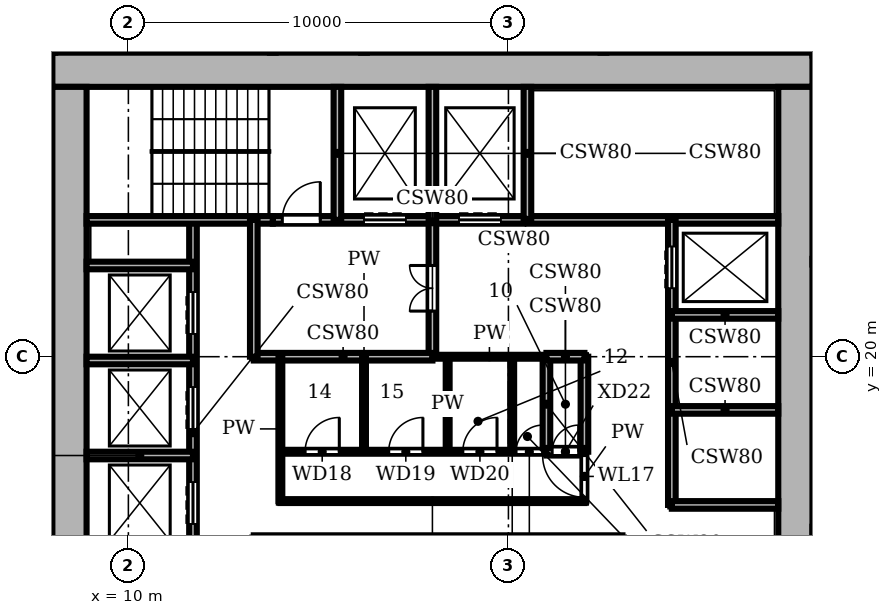
"""IFC4 building model, lengths in metres.
Left out: names, types, materials, properties, quantities, classifications, styles, units other than length and angle.
Written with IfcOpenShell. Run it as: python <this file> out.ifc"""

import sys

from ifc_helpers import new_model, si_unit, direction, frame, frame_2d, origin, place, context, subcontext, project, spatial, rectangle, extrude, element, fill, save


model = new_model("IFC4")
c1 = context("Model", 3, precision=1e-05, world=origin(), true_north=direction((0.0, 1.0)))
c2 = subcontext(c1, "Body", "Model", "MODEL_VIEW")
j1 = project(units=[si_unit("LENGTHUNIT", "METRE"), si_unit("PLANEANGLEUNIT", "RADIAN")], contexts=[c1])
p1 = place(None, origin())
s1 = spatial("IfcSite", under=j1, at=p1, CompositionType="ELEMENT")
p2 = place(p1, origin())
s2 = spatial("IfcBuilding", under=s1, at=p2, CompositionType="ELEMENT")
p3 = place(p2, frame((0.0, 0.0, 43.2)))
s3 = spatial("IfcBuildingStorey", under=s2, at=p3, CompositionType="ELEMENT", Elevation=43.2)
p4 = place(p3, frame((27.55, 8.9, 0.0), z_axis=(0.0, 0.0, 1.0), x_axis=(0.0, 1.0, 0.0)))
e1 = element("IfcWall", 1, at=p4, inside=s3, PredefinedType="SHEAR", context=c2, shape_type="SweptSolid", body=[
    extrude(rectangle(XDim=18.2, YDim=0.9, at=frame_2d((9.1, 0.0))), origin(), (0.0, 0.0, 1.0), 3.9),
])
p5 = place(p4, frame((4.55, 0.0, 0.0)))
e2 = element("IfcOpeningElement", 2, at=p5, cuts=e1, PredefinedType="OPENING", context=c2, shape_type="SweptSolid", body=[
    extrude(rectangle(XDim=1.6, YDim=2.1, at=frame_2d((0.8, 1.05))), frame((0.0, 0.46, 0.0), z_axis=(0.0, -1.0, 0.0), x_axis=(1.0, 0.0, 0.0)), (0.0, 0.0, 1.0), 0.92),
])
p6 = place(p3, frame((28.0, 27.55, 0.0), z_axis=(0.0, 0.0, 1.0), x_axis=(-1.0, 0.0, 0.0)))
e3 = element("IfcWall", 3, at=p6, inside=s3, PredefinedType="SHEAR", context=c2, shape_type="SweptSolid", body=[
    extrude(rectangle(XDim=20.0, YDim=0.9, at=frame_2d((10.0, 0.0))), origin(), (0.0, 0.0, 1.0), 3.9),
])
p7 = place(p3, frame((8.45, 27.1, 0.0), z_axis=(0.0, 0.0, 1.0), x_axis=(0.0, -1.0, 0.0)))
e4 = element("IfcWall", 4, at=p7, inside=s3, PredefinedType="SHEAR", context=c2, shape_type="SweptSolid", body=[
    extrude(rectangle(XDim=18.2, YDim=0.9, at=frame_2d((9.1, 0.0))), origin(), (0.0, 0.0, 1.0), 3.9),
])
p8 = place(p3, frame((24.3, 16.1, 0.0), z_axis=(0.0, 0.0, 1.0), x_axis=(1.0, 0.0, 0.0)))
e5 = element("IfcWall", 5, at=p8, inside=s3, PredefinedType="SHEAR", context=c2, shape_type="SweptSolid", body=[
    extrude(rectangle(XDim=2.8, YDim=0.2, at=frame_2d((1.4, 0.0))), origin(), (0.0, 0.0, 1.0), 3.58),
])
p9 = place(p3, frame((14.0, 16.2, 0.0), z_axis=(0.0, 0.0, 1.0), x_axis=(1.0, 0.0, 0.0)))
e6 = element("IfcWall", 6, at=p9, inside=s3, PredefinedType="PARTITIONING", context=c2, shape_type="SweptSolid", body=[
    extrude(rectangle(XDim=8.0, YDim=0.1, at=frame_2d((4.0, 0.0))), origin(), (0.0, 0.0, 1.0), 3.58),
])
p10 = place(p3, frame((8.9, 17.4, 0.0), z_axis=(0.0, 0.0, 1.0), x_axis=(1.0, 0.0, 0.0)))
e7 = element("IfcWall", 7, at=p10, inside=s3, PredefinedType="SHEAR", context=c2, shape_type="SweptSolid", body=[
    extrude(rectangle(XDim=2.8, YDim=0.2, at=frame_2d((1.4, 0.0))), origin(), (0.0, 0.0, 1.0), 3.58),
])
p11 = place(p3, frame((14.0, 17.5, 0.0), z_axis=(0.0, 0.0, 1.0), x_axis=(1.0, 0.0, 0.0)))
e8 = element("IfcWall", 8, at=p11, inside=s3, PredefinedType="PARTITIONING", context=c2, shape_type="SweptSolid", body=[
    extrude(rectangle(XDim=7.0, YDim=0.1, at=frame_2d((3.5, 0.0))), origin(), (0.0, 0.0, 1.0), 3.58),
])
p12 = place(p11, frame((0.65, 0.0, 0.0)))
e9 = element("IfcOpeningElement", 9, at=p12, cuts=e8, PredefinedType="OPENING", context=c2, shape_type="SweptSolid", body=[
    extrude(rectangle(XDim=0.9, YDim=2.1, at=frame_2d((0.45, 1.05))), frame((0.0, 0.06, 0.0), z_axis=(0.0, -1.0, 0.0), x_axis=(1.0, 0.0, 0.0)), (0.0, 0.0, 1.0), 0.12),
])
p13 = place(p11, frame((2.85, 0.0, 0.0)))
e10 = element("IfcOpeningElement", 10, at=p13, cuts=e8, PredefinedType="OPENING", context=c2, shape_type="SweptSolid", body=[
    extrude(rectangle(XDim=0.9, YDim=2.1, at=frame_2d((0.45, 1.05))), frame((0.0, 0.06, 0.0), z_axis=(0.0, -1.0, 0.0), x_axis=(1.0, 0.0, 0.0)), (0.0, 0.0, 1.0), 0.12),
])
p14 = place(p11, frame((4.8, 0.0, 0.0)))
e11 = element("IfcOpeningElement", 11, at=p14, cuts=e8, PredefinedType="OPENING", context=c2, shape_type="SweptSolid", body=[
    extrude(rectangle(XDim=0.9, YDim=2.1, at=frame_2d((0.45, 1.05))), frame((0.0, 0.06, 0.0), z_axis=(0.0, -1.0, 0.0), x_axis=(1.0, 0.0, 0.0)), (0.0, 0.0, 1.0), 0.12),
])
p15 = place(p11, frame((6.2, 0.0, 0.0)))
e12 = element("IfcOpeningElement", 12, at=p15, cuts=e8, PredefinedType="OPENING", context=c2, shape_type="SweptSolid", body=[
    extrude(rectangle(XDim=0.7, YDim=2.1, at=frame_2d((0.35, 1.05))), frame((0.0, 0.06, 0.0), z_axis=(0.0, -1.0, 0.0), x_axis=(1.0, 0.0, 0.0)), (0.0, 0.0, 1.0), 0.12),
])
p16 = place(p3, frame((21.0, 17.5, 0.0), z_axis=(0.0, 0.0, 1.0), x_axis=(1.0, 0.0, 0.0)))
e13 = element("IfcWall", 13, at=p16, inside=s3, PredefinedType="SHEAR", context=c2, shape_type="SweptSolid", body=[
    extrude(rectangle(XDim=1.0, YDim=0.2, at=frame_2d((0.5, 0.0))), origin(), (0.0, 0.0, 1.0), 3.58),
])
p17 = place(p16, frame((0.15, 0.0, 0.0)))
e14 = element("IfcOpeningElement", 14, at=p17, cuts=e13, PredefinedType="OPENING", context=c2, shape_type="SweptSolid", body=[
    extrude(rectangle(XDim=0.7, YDim=2.1, at=frame_2d((0.35, 1.05))), frame((0.0, 0.11, 0.0), z_axis=(0.0, -1.0, 0.0), x_axis=(1.0, 0.0, 0.0)), (0.0, 0.0, 1.0), 0.22),
])
for number, where, z_axis, x_axis in (
    (15, (24.3, 18.6, 0.0), (0.0, 0.0, 1.0), (1.0, 0.0, 0.0)),
    (16, (8.9, 19.9, 0.0), (0.0, 0.0, 1.0), (1.0, 0.0, 0.0)),
):
    element("IfcWall", number, at=place(p3, frame(where, z_axis=z_axis, x_axis=x_axis)), inside=s3, PredefinedType="SHEAR", context=c2, shape_type="SweptSolid", body=[
        extrude(rectangle(XDim=2.8, YDim=0.2, at=frame_2d((1.4, 0.0))), origin(), (0.0, 0.0, 1.0), 3.58),
    ])
p18 = place(p3, frame((18.0, 20.0, 0.0), z_axis=(0.0, 0.0, 1.0), x_axis=(1.0, 0.0, 0.0)))
e17 = element("IfcWall", 17, at=p18, inside=s3, PredefinedType="PARTITIONING", context=c2, shape_type="SweptSolid", body=[
    extrude(rectangle(XDim=3.0, YDim=0.1, at=frame_2d((1.5, 0.0))), origin(), (0.0, 0.0, 1.0), 3.58),
])
p19 = place(p3, frame((13.3, 20.0, 0.0), z_axis=(0.0, 0.0, 1.0), x_axis=(1.0, 0.0, 0.0)))
e18 = element("IfcWall", 18, at=p19, inside=s3, PredefinedType="SHEAR", context=c2, shape_type="SweptSolid", body=[
    extrude(rectangle(XDim=4.7, YDim=0.2, at=frame_2d((2.35, 0.0))), origin(), (0.0, 0.0, 1.0), 3.58),
])
p20 = place(p3, frame((21.0, 20.0, 0.0), z_axis=(0.0, 0.0, 1.0), x_axis=(1.0, 0.0, 0.0)))
e19 = element("IfcWall", 19, at=p20, inside=s3, PredefinedType="SHEAR", context=c2, shape_type="SweptSolid", body=[
    extrude(rectangle(XDim=1.0, YDim=0.2, at=frame_2d((0.5, 0.0))), origin(), (0.0, 0.0, 1.0), 3.58),
])
for number, where, z_axis, x_axis in (
    (20, (24.3, 21.1, 0.0), (0.0, 0.0, 1.0), (1.0, 0.0, 0.0)),
    (21, (8.9, 22.4, 0.0), (0.0, 0.0, 1.0), (1.0, 0.0, 0.0)),
):
    element("IfcWall", number, at=place(p3, frame(where, z_axis=z_axis, x_axis=x_axis)), inside=s3, PredefinedType="SHEAR", context=c2, shape_type="SweptSolid", body=[
        extrude(rectangle(XDim=2.8, YDim=0.2, at=frame_2d((1.4, 0.0))), origin(), (0.0, 0.0, 1.0), 3.58),
    ])
p21 = place(p3, frame((8.9, 23.6, 0.0), z_axis=(0.0, 0.0, 1.0), x_axis=(1.0, 0.0, 0.0)))
e22 = element("IfcWall", 22, at=p21, inside=s3, PredefinedType="SHEAR", context=c2, shape_type="SweptSolid", body=[
    extrude(rectangle(XDim=4.9, YDim=0.2, at=frame_2d((2.45, 0.0))), origin(), (0.0, 0.0, 1.0), 3.58),
])
p22 = place(p3, frame((13.8, 23.6, 0.0), z_axis=(0.0, 0.0, 1.0), x_axis=(1.0, 0.0, 0.0)))
e23 = element("IfcWall", 23, at=p22, inside=s3, PredefinedType="SHEAR", context=c2, shape_type="SweptSolid", body=[
    extrude(rectangle(XDim=13.3, YDim=0.2, at=frame_2d((6.65, 0.0))), origin(), (0.0, 0.0, 1.0), 3.58),
])
p23 = place(p22, frame((2.4, 0.0, 0.0)))
e24 = element("IfcOpeningElement", 24, at=p23, cuts=e23, PredefinedType="OPENING", context=c2, shape_type="SweptSolid", body=[
    extrude(rectangle(XDim=1.1, YDim=2.1, at=frame_2d((0.55, 1.05))), frame((0.0, 0.11, 0.0), z_axis=(0.0, -1.0, 0.0), x_axis=(1.0, 0.0, 0.0)), (0.0, 0.0, 1.0), 0.22),
])
p24 = place(p22, frame((4.9, 0.0, 0.0)))
e25 = element("IfcOpeningElement", 25, at=p24, cuts=e23, PredefinedType="OPENING", context=c2, shape_type="SweptSolid", body=[
    extrude(rectangle(XDim=1.1, YDim=2.1, at=frame_2d((0.55, 1.05))), frame((0.0, 0.11, 0.0), z_axis=(0.0, -1.0, 0.0), x_axis=(1.0, 0.0, 0.0)), (0.0, 0.0, 1.0), 0.22),
])
p25 = place(p22, frame((0.25, 0.0, 0.0)))
e26 = element("IfcOpeningElement", 26, at=p25, cuts=e23, PredefinedType="OPENING", context=c2, shape_type="SweptSolid", body=[
    extrude(rectangle(XDim=1.0, YDim=2.1, at=frame_2d((0.5, 1.05))), frame((0.0, 0.11, 0.0), z_axis=(0.0, -1.0, 0.0), x_axis=(1.0, 0.0, 0.0)), (0.0, 0.0, 1.0), 0.22),
])
p26 = place(p3, frame((11.7, 12.4, 0.0), z_axis=(0.0, 0.0, 1.0), x_axis=(0.0, 1.0, 0.0)))
e27 = element("IfcWall", 27, at=p26, inside=s3, PredefinedType="SHEAR", context=c2, shape_type="SweptSolid", body=[
    extrude(rectangle(XDim=11.2, YDim=0.2, at=frame_2d((5.6, 0.0))), origin(), (0.0, 0.0, 1.0), 3.58),
])
p27 = place(p26, frame((0.7, 0.0, 0.0)))
e28 = element("IfcOpeningElement", 28, at=p27, cuts=e27, PredefinedType="OPENING", context=c2, shape_type="SweptSolid", body=[
    extrude(rectangle(XDim=1.1, YDim=2.1, at=frame_2d((0.55, 1.05))), frame((0.0, 0.11, 0.0), z_axis=(0.0, -1.0, 0.0), x_axis=(1.0, 0.0, 0.0)), (0.0, 0.0, 1.0), 0.22),
])
p28 = place(p26, frame((3.2, 0.0, 0.0)))
e29 = element("IfcOpeningElement", 29, at=p28, cuts=e27, PredefinedType="OPENING", context=c2, shape_type="SweptSolid", body=[
    extrude(rectangle(XDim=1.1, YDim=2.1, at=frame_2d((0.55, 1.05))), frame((0.0, 0.11, 0.0), z_axis=(0.0, -1.0, 0.0), x_axis=(1.0, 0.0, 0.0)), (0.0, 0.0, 1.0), 0.22),
])
p29 = place(p26, frame((5.7, 0.0, 0.0)))
e30 = element("IfcOpeningElement", 30, at=p29, cuts=e27, PredefinedType="OPENING", context=c2, shape_type="SweptSolid", body=[
    extrude(rectangle(XDim=1.1, YDim=2.1, at=frame_2d((0.55, 1.05))), frame((0.0, 0.11, 0.0), z_axis=(0.0, -1.0, 0.0), x_axis=(1.0, 0.0, 0.0)), (0.0, 0.0, 1.0), 0.22),
])
p30 = place(p26, frame((8.2, 0.0, 0.0)))
e31 = element("IfcOpeningElement", 31, at=p30, cuts=e27, PredefinedType="OPENING", context=c2, shape_type="SweptSolid", body=[
    extrude(rectangle(XDim=1.1, YDim=2.1, at=frame_2d((0.55, 1.05))), frame((0.0, 0.11, 0.0), z_axis=(0.0, -1.0, 0.0), x_axis=(1.0, 0.0, 0.0)), (0.0, 0.0, 1.0), 0.22),
])
p31 = place(p3, frame((13.3, 20.0, 0.0), z_axis=(0.0, 0.0, 1.0), x_axis=(0.0, 1.0, 0.0)))
e32 = element("IfcWall", 32, at=p31, inside=s3, PredefinedType="SHEAR", context=c2, shape_type="SweptSolid", body=[
    extrude(rectangle(XDim=3.6, YDim=0.2, at=frame_2d((1.8, 0.0))), origin(), (0.0, 0.0, 1.0), 3.58),
])
p32 = place(p3, frame((14.0, 16.2, 0.0), z_axis=(0.0, 0.0, 1.0), x_axis=(0.0, 1.0, 0.0)))
e33 = element("IfcWall", 33, at=p32, inside=s3, PredefinedType="PARTITIONING", context=c2, shape_type="SweptSolid", body=[
    extrude(rectangle(XDim=3.8, YDim=0.1, at=frame_2d((1.9, 0.0))), origin(), (0.0, 0.0, 1.0), 3.58),
])
p33 = place(p3, frame((15.5, 23.6, 0.0), z_axis=(0.0, 0.0, 1.0), x_axis=(0.0, 1.0, 0.0)))
e34 = element("IfcWall", 34, at=p33, inside=s3, PredefinedType="SHEAR", context=c2, shape_type="SweptSolid", body=[
    extrude(rectangle(XDim=3.5, YDim=0.2, at=frame_2d((1.75, 0.0))), origin(), (0.0, 0.0, 1.0), 3.58),
])
p34 = place(p3, frame((16.2, 17.5, 0.0), z_axis=(0.0, 0.0, 1.0), x_axis=(0.0, 1.0, 0.0)))
e35 = element("IfcWall", 35, at=p34, inside=s3, PredefinedType="PARTITIONING", context=c2, shape_type="SweptSolid", body=[
    extrude(rectangle(XDim=2.5, YDim=0.1, at=frame_2d((1.25, 0.0))), origin(), (0.0, 0.0, 1.0), 3.58),
])
p35 = place(p3, frame((18.0, 20.0, 0.0), z_axis=(0.0, 0.0, 1.0), x_axis=(0.0, 1.0, 0.0)))
e36 = element("IfcWall", 36, at=p35, inside=s3, PredefinedType="SHEAR", context=c2, shape_type="SweptSolid", body=[
    extrude(rectangle(XDim=7.1, YDim=0.2, at=frame_2d((3.55, 0.0))), origin(), (0.0, 0.0, 1.0), 3.58),
])
p36 = place(p35, frame((1.2, 0.0, 0.0)))
e37 = element("IfcOpeningElement", 37, at=p36, cuts=e36, PredefinedType="OPENING", context=c2, shape_type="SweptSolid", body=[
    extrude(rectangle(XDim=1.2, YDim=2.1, at=frame_2d((0.6, 1.05))), frame((0.0, 0.11, 0.0), z_axis=(0.0, -1.0, 0.0), x_axis=(1.0, 0.0, 0.0)), (0.0, 0.0, 1.0), 0.22),
])
for number, where, z_axis, x_axis in (
    (38, (18.4, 17.5, 0.0), (0.0, 0.0, 1.0), (0.0, 1.0, 0.0)),
    (39, (20.1, 17.5, 0.0), (0.0, 0.0, 1.0), (0.0, 1.0, 0.0)),
):
    element("IfcWall", number, at=place(p3, frame(where, z_axis=z_axis, x_axis=x_axis)), inside=s3, PredefinedType="PARTITIONING", context=c2, shape_type="SweptSolid", body=[
        extrude(rectangle(XDim=2.5, YDim=0.1, at=frame_2d((1.25, 0.0))), origin(), (0.0, 0.0, 1.0), 3.58),
    ])
p37 = place(p3, frame((20.5, 23.6, 0.0), z_axis=(0.0, 0.0, 1.0), x_axis=(0.0, 1.0, 0.0)))
e40 = element("IfcWall", 40, at=p37, inside=s3, PredefinedType="SHEAR", context=c2, shape_type="SweptSolid", body=[
    extrude(rectangle(XDim=3.5, YDim=0.2, at=frame_2d((1.75, 0.0))), origin(), (0.0, 0.0, 1.0), 3.58),
])
p38 = place(p3, frame((21.0, 17.5, 0.0), z_axis=(0.0, 0.0, 1.0), x_axis=(0.0, 1.0, 0.0)))
e41 = element("IfcWall", 41, at=p38, inside=s3, PredefinedType="SHEAR", context=c2, shape_type="SweptSolid", body=[
    extrude(rectangle(XDim=2.5, YDim=0.2, at=frame_2d((1.25, 0.0))), origin(), (0.0, 0.0, 1.0), 3.58),
])
p39 = place(p3, frame((22.0, 16.2, 0.0), z_axis=(0.0, 0.0, 1.0), x_axis=(0.0, 1.0, 0.0)))
e42 = element("IfcWall", 42, at=p39, inside=s3, PredefinedType="PARTITIONING", context=c2, shape_type="SweptSolid", body=[
    extrude(rectangle(XDim=1.3, YDim=0.1, at=frame_2d((0.65, 0.0))), origin(), (0.0, 0.0, 1.0), 3.58),
])
p40 = place(p39, frame((0.1, 0.0, 0.0)))
e43 = element("IfcOpeningElement", 43, at=p40, cuts=e42, PredefinedType="OPENING", context=c2, shape_type="SweptSolid", body=[
    extrude(rectangle(XDim=1.1, YDim=2.1, at=frame_2d((0.55, 1.05))), frame((0.0, 0.06, 0.0), z_axis=(0.0, -1.0, 0.0), x_axis=(1.0, 0.0, 0.0)), (0.0, 0.0, 1.0), 0.12),
])
p41 = place(p3, frame((22.0, 17.5, 0.0), z_axis=(0.0, 0.0, 1.0), x_axis=(0.0, 1.0, 0.0)))
e44 = element("IfcWall", 44, at=p41, inside=s3, PredefinedType="SHEAR", context=c2, shape_type="SweptSolid", body=[
    extrude(rectangle(XDim=2.5, YDim=0.2, at=frame_2d((1.25, 0.0))), origin(), (0.0, 0.0, 1.0), 3.58),
])
p42 = place(p3, frame((24.3, 16.1, 0.0), z_axis=(0.0, 0.0, 1.0), x_axis=(0.0, 1.0, 0.0)))
e45 = element("IfcWall", 45, at=p42, inside=s3, PredefinedType="SHEAR", context=c2, shape_type="SweptSolid", body=[
    extrude(rectangle(XDim=7.5, YDim=0.2, at=frame_2d((3.75, 0.0))), origin(), (0.0, 0.0, 1.0), 3.58),
])
p43 = place(p42, frame((5.7, 0.0, 0.0)))
e46 = element("IfcOpeningElement", 46, at=p43, cuts=e45, PredefinedType="OPENING", context=c2, shape_type="SweptSolid", body=[
    extrude(rectangle(XDim=1.1, YDim=2.1, at=frame_2d((0.55, 1.05))), frame((0.0, 0.11, 0.0), z_axis=(0.0, -1.0, 0.0), x_axis=(1.0, 0.0, 0.0)), (0.0, 0.0, 1.0), 0.22),
])
for number, where, z_axis, x_axis in (
    (47, (13.8, 28.0, 0.0), (0.0, 0.0, 1.0), (0.0, 1.0, 0.0)),
    (48, (16.2, 28.0, 0.0), (0.0, 0.0, 1.0), (0.0, 1.0, 0.0)),
    (49, (22.5, 28.0, 0.0), (0.0, 0.0, 1.0), (0.0, 1.0, 0.0)),
    (50, (28.0, 15.45, 0.0), (0.0, 0.0, 1.0), (1.0, 0.0, 0.0)),
    (51, (28.0, 22.5, 0.0), (0.0, 0.0, 1.0), (1.0, 0.0, 0.0)),
    (52, (28.0, 28.0, 0.0), (0.0, 0.0, 1.0), (1.0, 0.0, 0.0)),
):
    element("IfcWall", number, at=place(p3, frame(where, z_axis=z_axis, x_axis=x_axis)), inside=s3, PredefinedType="PARTITIONING", context=c2, shape_type="SweptSolid", body=[
        extrude(rectangle(XDim=2.8, YDim=0.15, at=frame_2d((1.4, 0.0))), origin(), (0.0, 0.0, 1.0), 3.58),
    ])
p44 = place(p28, origin())
e53 = element("IfcDoor", 53, at=p44, inside=s3, OperationType="DOUBLE_DOOR_SLIDING", PredefinedType="DOOR", context=c2, shape_type="SweptSolid", body=[
    extrude(rectangle(XDim=1.1, YDim=2.1, at=frame_2d((0.55, 1.05))), frame((0.0, 0.025, 0.0), z_axis=(0.0, -1.0, 0.0), x_axis=(1.0, 0.0, 0.0)), (0.0, 0.0, 1.0), 0.05),
])
fill(e29, e53)
p45 = place(p29, origin())
e54 = element("IfcDoor", 54, at=p45, inside=s3, OperationType="DOUBLE_DOOR_SLIDING", PredefinedType="DOOR", context=c2, shape_type="SweptSolid", body=[
    extrude(rectangle(XDim=1.1, YDim=2.1, at=frame_2d((0.55, 1.05))), frame((0.0, 0.025, 0.0), z_axis=(0.0, -1.0, 0.0), x_axis=(1.0, 0.0, 0.0)), (0.0, 0.0, 1.0), 0.05),
])
fill(e30, e54)
p46 = place(p30, origin())
e55 = element("IfcDoor", 55, at=p46, inside=s3, OperationType="DOUBLE_DOOR_SLIDING", PredefinedType="DOOR", context=c2, shape_type="SweptSolid", body=[
    extrude(rectangle(XDim=1.1, YDim=2.1, at=frame_2d((0.55, 1.05))), frame((0.0, 0.025, 0.0), z_axis=(0.0, -1.0, 0.0), x_axis=(1.0, 0.0, 0.0)), (0.0, 0.0, 1.0), 0.05),
])
fill(e31, e55)
p47 = place(p43, origin())
e56 = element("IfcDoor", 56, at=p47, inside=s3, OperationType="DOUBLE_DOOR_SLIDING", PredefinedType="DOOR", context=c2, shape_type="SweptSolid", body=[
    extrude(rectangle(XDim=1.1, YDim=2.1, at=frame_2d((0.55, 1.05))), frame((0.0, 0.025, 0.0), z_axis=(0.0, -1.0, 0.0), x_axis=(1.0, 0.0, 0.0)), (0.0, 0.0, 1.0), 0.05),
])
fill(e46, e56)
p48 = place(p23, origin())
e57 = element("IfcDoor", 57, at=p48, inside=s3, OperationType="DOUBLE_DOOR_SLIDING", PredefinedType="DOOR", context=c2, shape_type="SweptSolid", body=[
    extrude(rectangle(XDim=1.1, YDim=2.1, at=frame_2d((0.55, 1.05))), frame((0.0, 0.025, 0.0), z_axis=(0.0, -1.0, 0.0), x_axis=(1.0, 0.0, 0.0)), (0.0, 0.0, 1.0), 0.05),
])
fill(e24, e57)
p49 = place(p24, origin())
e58 = element("IfcDoor", 58, at=p49, inside=s3, OperationType="DOUBLE_DOOR_SLIDING", PredefinedType="DOOR", context=c2, shape_type="SweptSolid", body=[
    extrude(rectangle(XDim=1.1, YDim=2.1, at=frame_2d((0.55, 1.05))), frame((0.0, 0.025, 0.0), z_axis=(0.0, -1.0, 0.0), x_axis=(1.0, 0.0, 0.0)), (0.0, 0.0, 1.0), 0.05),
])
fill(e25, e58)
p50 = place(p25, origin())
e59 = element("IfcDoor", 59, at=p50, inside=s3, OperationType="SINGLE_SWING_RIGHT", PredefinedType="DOOR", context=c2, shape_type="SweptSolid", body=[
    extrude(rectangle(XDim=1.0, YDim=2.1, at=frame_2d((0.5, 1.05))), frame((0.0, 0.025, 0.0), z_axis=(0.0, -1.0, 0.0), x_axis=(1.0, 0.0, 0.0)), (0.0, 0.0, 1.0), 0.05),
])
fill(e26, e59)
p51 = place(p36, origin())
e60 = element("IfcDoor", 60, at=p51, inside=s3, OperationType="DOUBLE_DOOR_SINGLE_SWING", PredefinedType="DOOR", context=c2, shape_type="SweptSolid", body=[
    extrude(rectangle(XDim=1.2, YDim=2.1, at=frame_2d((0.6, 1.05))), frame((0.0, 0.025, 0.0), z_axis=(0.0, -1.0, 0.0), x_axis=(1.0, 0.0, 0.0)), (0.0, 0.0, 1.0), 0.05),
])
fill(e37, e60)
p52 = place(p40, origin())
e61 = element("IfcDoor", 61, at=p52, inside=s3, OperationType="SINGLE_SWING_RIGHT", PredefinedType="DOOR", context=c2, shape_type="SweptSolid", body=[
    extrude(rectangle(XDim=1.1, YDim=2.1, at=frame_2d((0.55, 1.05))), frame((0.0, 0.025, 0.0), z_axis=(0.0, -1.0, 0.0), x_axis=(1.0, 0.0, 0.0)), (0.0, 0.0, 1.0), 0.05),
])
fill(e43, e61)
p53 = place(p12, origin())
e62 = element("IfcDoor", 62, at=p53, inside=s3, OperationType="SINGLE_SWING_RIGHT", PredefinedType="DOOR", context=c2, shape_type="SweptSolid", body=[
    extrude(rectangle(XDim=0.9, YDim=2.1, at=frame_2d((0.45, 1.05))), frame((0.0, 0.025, 0.0), z_axis=(0.0, -1.0, 0.0), x_axis=(1.0, 0.0, 0.0)), (0.0, 0.0, 1.0), 0.05),
])
fill(e9, e62)
p54 = place(p13, origin())
e63 = element("IfcDoor", 63, at=p54, inside=s3, OperationType="SINGLE_SWING_RIGHT", PredefinedType="DOOR", context=c2, shape_type="SweptSolid", body=[
    extrude(rectangle(XDim=0.9, YDim=2.1, at=frame_2d((0.45, 1.05))), frame((0.0, 0.025, 0.0), z_axis=(0.0, -1.0, 0.0), x_axis=(1.0, 0.0, 0.0)), (0.0, 0.0, 1.0), 0.05),
])
fill(e10, e63)
p55 = place(p14, origin())
e64 = element("IfcDoor", 64, at=p55, inside=s3, OperationType="SINGLE_SWING_RIGHT", PredefinedType="DOOR", context=c2, shape_type="SweptSolid", body=[
    extrude(rectangle(XDim=0.9, YDim=2.1, at=frame_2d((0.45, 1.05))), frame((0.0, 0.025, 0.0), z_axis=(0.0, -1.0, 0.0), x_axis=(1.0, 0.0, 0.0)), (0.0, 0.0, 1.0), 0.05),
])
fill(e11, e64)
p56 = place(p15, origin())
e65 = element("IfcDoor", 65, at=p56, inside=s3, OperationType="SINGLE_SWING_RIGHT", PredefinedType="DOOR", context=c2, shape_type="SweptSolid", body=[
    extrude(rectangle(XDim=0.7, YDim=2.1, at=frame_2d((0.35, 1.05))), frame((0.0, 0.025, 0.0), z_axis=(0.0, -1.0, 0.0), x_axis=(1.0, 0.0, 0.0)), (0.0, 0.0, 1.0), 0.05),
])
fill(e12, e65)
p57 = place(p17, origin())
e66 = element("IfcDoor", 66, at=p57, inside=s3, OperationType="SINGLE_SWING_RIGHT", PredefinedType="DOOR", context=c2, shape_type="SweptSolid", body=[
    extrude(rectangle(XDim=0.7, YDim=2.1, at=frame_2d((0.35, 1.05))), frame((0.0, 0.025, 0.0), z_axis=(0.0, -1.0, 0.0), x_axis=(1.0, 0.0, 0.0)), (0.0, 0.0, 1.0), 0.05),
])
fill(e14, e66)
save(model, sys.argv[1])
